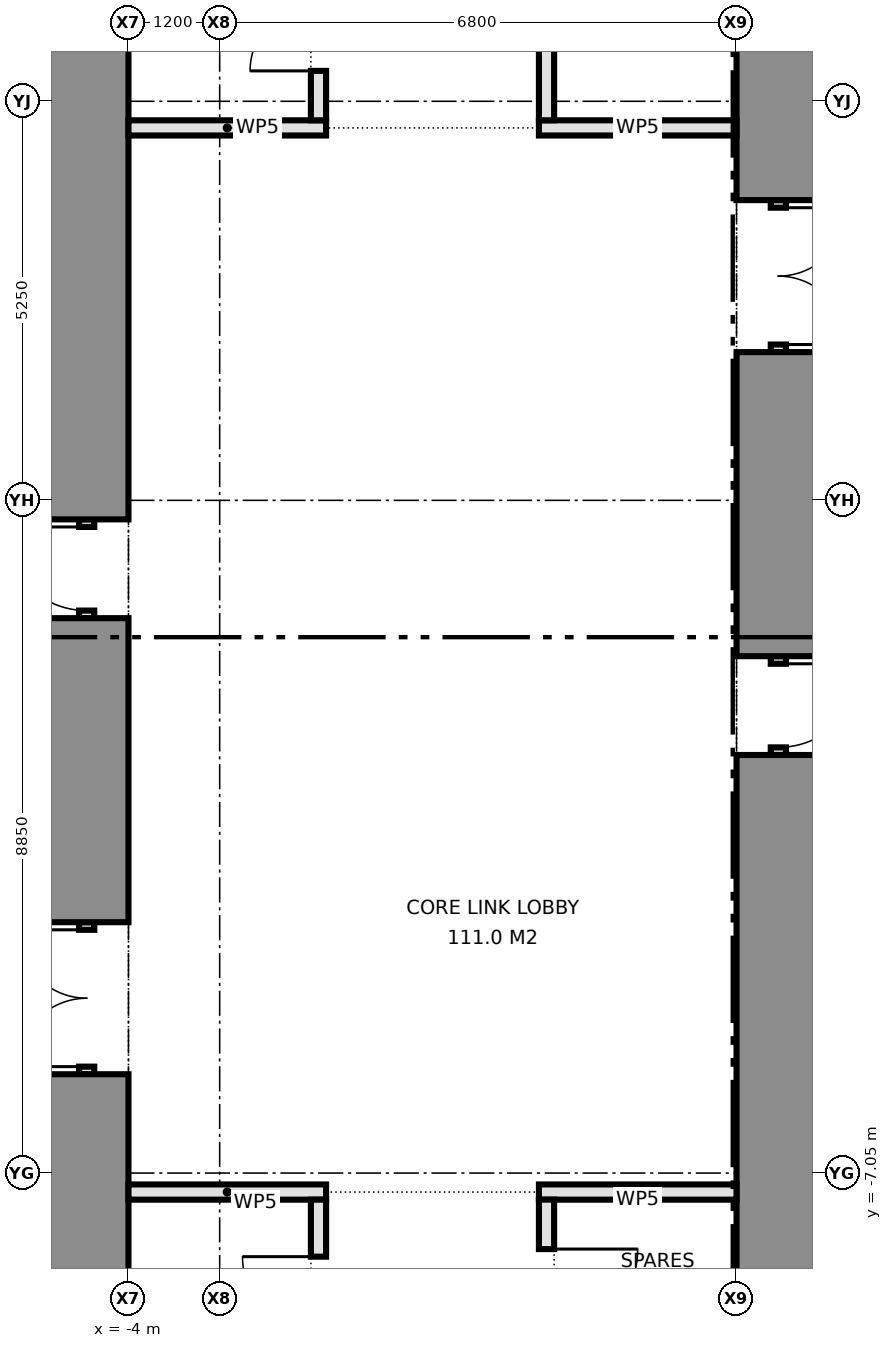
"""IFC4 building model, lengths in metres.
Left out: names, types, materials, properties, quantities, classifications, styles, units other than length and angle.
Written with IfcOpenShell. Run it as: python <this file> out.ifc"""

import sys

from ifc_helpers import new_model, si_unit, direction, frame, frame_2d, origin, place, context, subcontext, project, spatial, rectangle, extrude, element, fill, save


model = new_model("IFC4")
c1 = context("Model", 3, precision=1e-05, world=origin(), true_north=direction((0.0, 1.0)))
c2 = subcontext(c1, "Body", "Model", "MODEL_VIEW")
j1 = project(units=[si_unit("LENGTHUNIT", "METRE"), si_unit("PLANEANGLEUNIT", "RADIAN")], contexts=[c1])
p1 = place(None, origin())
s1 = spatial("IfcSite", under=j1, at=p1, CompositionType="ELEMENT")
p2 = place(p1, origin())
s2 = spatial("IfcBuilding", under=s1, at=p2, CompositionType="ELEMENT")
p3 = place(p2, frame((0.0, 0.0, 54.5)))
s3 = spatial("IfcBuildingStorey", under=s2, at=p3, CompositionType="ELEMENT", Elevation=54.5)
p4 = place(p3, frame((-4.55, -8.9, 0.0), z_axis=(0.0, 0.0, 1.0), x_axis=(0.0, 1.0, 0.0)))
e1 = element("IfcWall", 1, at=p4, inside=s3, PredefinedType="SHEAR", context=c2, shape_type="SweptSolid", body=[
    extrude(rectangle(XDim=3.15, YDim=1.1, at=frame_2d((1.575, 0.0))), origin(), (0.0, 0.0, 1.0), 4.575),
])
p5 = place(p3, frame((-4.55, -5.75, 0.0), z_axis=(0.0, 0.0, 1.0), x_axis=(0.0, 1.0, 0.0)))
e2 = element("IfcWall", 2, at=p5, inside=s3, PredefinedType="PARTITIONING", context=c2, shape_type="SweptSolid", body=[
    extrude(rectangle(XDim=2.0, YDim=0.2, at=frame_2d((1.0, 0.0))), origin(), (0.0, 0.0, 1.0), 2.4),
])
p6 = place(p5, frame((0.1, 0.0, 0.0)))
e3 = element("IfcOpeningElement", 3, at=p6, cuts=e2, PredefinedType="OPENING", context=c2, shape_type="SweptSolid", body=[
    extrude(rectangle(XDim=1.8, YDim=2.1, at=frame_2d((0.9, 1.05))), frame((0.0, 0.11, 0.0), z_axis=(0.0, -1.0, 0.0), x_axis=(1.0, 0.0, 0.0)), (0.0, 0.0, 1.0), 0.22),
])
p7 = place(p3, frame((-4.55, -3.75, 0.0), z_axis=(0.0, 0.0, 1.0), x_axis=(0.0, 1.0, 0.0)))
e4 = element("IfcWall", 4, at=p7, inside=s3, PredefinedType="SHEAR", context=c2, shape_type="SweptSolid", body=[
    extrude(rectangle(XDim=4.0, YDim=1.1, at=frame_2d((2.0, 0.0))), origin(), (0.0, 0.0, 1.0), 4.575),
])
p8 = place(p3, frame((-4.55, 0.25, 0.0), z_axis=(0.0, 0.0, 1.0), x_axis=(0.0, 1.0, 0.0)))
e5 = element("IfcWall", 5, at=p8, inside=s3, PredefinedType="PARTITIONING", context=c2, shape_type="SweptSolid", body=[
    extrude(rectangle(XDim=1.3, YDim=0.2, at=frame_2d((0.65, 0.0))), origin(), (0.0, 0.0, 1.0), 2.4),
])
p9 = place(p8, frame((0.1, 0.0, 0.0)))
e6 = element("IfcOpeningElement", 6, at=p9, cuts=e5, PredefinedType="OPENING", context=c2, shape_type="SweptSolid", body=[
    extrude(rectangle(XDim=1.1, YDim=2.1, at=frame_2d((0.55, 1.05))), frame((0.0, 0.11, 0.0), z_axis=(0.0, -1.0, 0.0), x_axis=(1.0, 0.0, 0.0)), (0.0, 0.0, 1.0), 0.22),
])
p10 = place(p3, frame((-4.55, 1.55, 0.0), z_axis=(0.0, 0.0, 1.0), x_axis=(0.0, 1.0, 0.0)))
e7 = element("IfcWall", 7, at=p10, inside=s3, PredefinedType="SHEAR", context=c2, shape_type="SweptSolid", body=[
    extrude(rectangle(XDim=7.35, YDim=1.1, at=frame_2d((3.675, 0.0))), origin(), (0.0, 0.0, 1.0), 4.575),
])
p11 = place(p3, frame((4.55, 8.9, 0.0), z_axis=(0.0, 0.0, 1.0), x_axis=(0.0, -1.0, 0.0)))
e8 = element("IfcWall", 8, at=p11, inside=s3, PredefinedType="SHEAR", context=c2, shape_type="SweptSolid", body=[
    extrude(rectangle(XDim=3.15, YDim=1.1, at=frame_2d((1.575, 0.0))), origin(), (0.0, 0.0, 1.0), 4.575),
])
p12 = place(p3, frame((4.55, 5.75, 0.0), z_axis=(0.0, 0.0, 1.0), x_axis=(0.0, -1.0, 0.0)))
e9 = element("IfcWall", 9, at=p12, inside=s3, PredefinedType="PARTITIONING", context=c2, shape_type="SweptSolid", body=[
    extrude(rectangle(XDim=2.0, YDim=0.2, at=frame_2d((1.0, 0.0))), origin(), (0.0, 0.0, 1.0), 2.4),
])
p13 = place(p12, frame((0.1, 0.0, 0.0)))
e10 = element("IfcOpeningElement", 10, at=p13, cuts=e9, PredefinedType="OPENING", context=c2, shape_type="SweptSolid", body=[
    extrude(rectangle(XDim=1.8, YDim=2.1, at=frame_2d((0.9, 1.05))), frame((0.0, 0.11, 0.0), z_axis=(0.0, -1.0, 0.0), x_axis=(1.0, 0.0, 0.0)), (0.0, 0.0, 1.0), 0.22),
])
p14 = place(p3, frame((4.55, 3.75, 0.0), z_axis=(0.0, 0.0, 1.0), x_axis=(0.0, -1.0, 0.0)))
e11 = element("IfcWall", 11, at=p14, inside=s3, PredefinedType="SHEAR", context=c2, shape_type="SweptSolid", body=[
    extrude(rectangle(XDim=4.0, YDim=1.1, at=frame_2d((2.0, 0.0))), origin(), (0.0, 0.0, 1.0), 4.575),
])
p15 = place(p3, frame((4.55, -0.25, 0.0), z_axis=(0.0, 0.0, 1.0), x_axis=(0.0, -1.0, 0.0)))
e12 = element("IfcWall", 12, at=p15, inside=s3, PredefinedType="PARTITIONING", context=c2, shape_type="SweptSolid", body=[
    extrude(rectangle(XDim=1.3, YDim=0.2, at=frame_2d((0.65, 0.0))), origin(), (0.0, 0.0, 1.0), 2.4),
])
p16 = place(p15, frame((0.1, 0.0, 0.0)))
e13 = element("IfcOpeningElement", 13, at=p16, cuts=e12, PredefinedType="OPENING", context=c2, shape_type="SweptSolid", body=[
    extrude(rectangle(XDim=1.1, YDim=2.1, at=frame_2d((0.55, 1.05))), frame((0.0, 0.11, 0.0), z_axis=(0.0, -1.0, 0.0), x_axis=(1.0, 0.0, 0.0)), (0.0, 0.0, 1.0), 0.22),
])
p17 = place(p3, frame((4.55, -1.55, 0.0), z_axis=(0.0, 0.0, 1.0), x_axis=(0.0, -1.0, 0.0)))
e14 = element("IfcWall", 14, at=p17, inside=s3, PredefinedType="SHEAR", context=c2, shape_type="SweptSolid", body=[
    extrude(rectangle(XDim=7.35, YDim=1.1, at=frame_2d((3.675, 0.0))), origin(), (0.0, 0.0, 1.0), 4.575),
])
for number, where, z_axis, x_axis in (
    (15, (-4.0, -7.3, 0.0), (0.0, 0.0, 1.0), (1.0, 0.0, 0.0)),
    (16, (1.4, -7.3, 0.0), (0.0, 0.0, 1.0), (1.0, 0.0, 0.0)),
    (17, (-4.0, 6.7, 0.0), (0.0, 0.0, 1.0), (1.0, 0.0, 0.0)),
    (18, (1.4, 6.7, 0.0), (0.0, 0.0, 1.0), (1.0, 0.0, 0.0)),
):
    element("IfcWall", number, at=place(p3, frame(where, z_axis=z_axis, x_axis=x_axis)), inside=s3, PredefinedType="PARTITIONING", context=c2, shape_type="SweptSolid", body=[
        extrude(rectangle(XDim=2.6, YDim=0.2, at=frame_2d((1.3, 0.0))), origin(), (0.0, 0.0, 1.0), 4.575),
    ])
p18 = place(p3, frame((1.5, -9.9, 0.0), z_axis=(0.0, 0.0, 1.0), x_axis=(0.0, 1.0, 0.0)))
e19 = element("IfcWall", 19, at=p18, inside=s3, PredefinedType="PARTITIONING", context=c2, shape_type="SweptSolid", body=[
    extrude(rectangle(XDim=2.5, YDim=0.2, at=frame_2d((1.25, 0.0))), origin(), (0.0, 0.0, 1.0), 4.575),
])
p19 = place(p18, frame((0.65, 0.0, 0.0)))
e20 = element("IfcOpeningElement", 20, at=p19, cuts=e19, PredefinedType="OPENING", context=c2, shape_type="SweptSolid", body=[
    extrude(rectangle(XDim=1.2, YDim=2.1, at=frame_2d((0.6, 1.05))), frame((0.0, 0.11, 0.0), z_axis=(0.0, -1.0, 0.0), x_axis=(1.0, 0.0, 0.0)), (0.0, 0.0, 1.0), 0.22),
])
p20 = place(p3, frame((1.5, 6.8, 0.0), z_axis=(0.0, 0.0, 1.0), x_axis=(0.0, 1.0, 0.0)))
e21 = element("IfcWall", 21, at=p20, inside=s3, PredefinedType="PARTITIONING", context=c2, shape_type="SweptSolid", body=[
    extrude(rectangle(XDim=3.1, YDim=0.2, at=frame_2d((1.55, 0.0))), origin(), (0.0, 0.0, 1.0), 4.575),
])
p21 = place(p20, frame((1.05, 0.0, 0.0)))
e22 = element("IfcOpeningElement", 22, at=p21, cuts=e21, PredefinedType="OPENING", context=c2, shape_type="SweptSolid", body=[
    extrude(rectangle(XDim=1.0, YDim=2.1, at=frame_2d((0.5, 1.05))), frame((0.0, 0.11, 0.0), z_axis=(0.0, -1.0, 0.0), x_axis=(1.0, 0.0, 0.0)), (0.0, 0.0, 1.0), 0.22),
])
p22 = place(p3, frame((-1.5, -9.9, 0.0), z_axis=(0.0, 0.0, 1.0), x_axis=(0.0, 1.0, 0.0)))
e23 = element("IfcWall", 23, at=p22, inside=s3, PredefinedType="PARTITIONING", context=c2, shape_type="SweptSolid", body=[
    extrude(rectangle(XDim=2.5, YDim=0.2, at=frame_2d((1.25, 0.0))), origin(), (0.0, 0.0, 1.0), 4.575),
])
p23 = place(p22, frame((0.75, 0.0, 0.0)))
e24 = element("IfcOpeningElement", 24, at=p23, cuts=e23, PredefinedType="OPENING", context=c2, shape_type="SweptSolid", body=[
    extrude(rectangle(XDim=1.0, YDim=2.1, at=frame_2d((0.5, 1.05))), frame((0.0, 0.11, 0.0), z_axis=(0.0, -1.0, 0.0), x_axis=(1.0, 0.0, 0.0)), (0.0, 0.0, 1.0), 0.22),
])
p24 = place(p3, frame((-1.5, 6.8, 0.0), z_axis=(0.0, 0.0, 1.0), x_axis=(0.0, 1.0, 0.0)))
e25 = element("IfcWall", 25, at=p24, inside=s3, PredefinedType="PARTITIONING", context=c2, shape_type="SweptSolid", body=[
    extrude(rectangle(XDim=3.1, YDim=0.2, at=frame_2d((1.55, 0.0))), origin(), (0.0, 0.0, 1.0), 4.575),
])
p25 = place(p24, frame((0.65, 0.0, 0.0)))
e26 = element("IfcOpeningElement", 26, at=p25, cuts=e25, PredefinedType="OPENING", context=c2, shape_type="SweptSolid", body=[
    extrude(rectangle(XDim=1.8, YDim=2.1, at=frame_2d((0.9, 1.05))), frame((0.0, 0.11, 0.0), z_axis=(0.0, -1.0, 0.0), x_axis=(1.0, 0.0, 0.0)), (0.0, 0.0, 1.0), 0.22),
])
p26 = place(p6, origin())
e27 = element("IfcDoor", 27, at=p26, inside=s3, OperationType="DOUBLE_DOOR_SINGLE_SWING", PredefinedType="DOOR", context=c2, shape_type="SweptSolid", body=[
    extrude(rectangle(XDim=1.8, YDim=2.1, at=frame_2d((0.9, 1.05))), frame((0.0, 0.025, 0.0), z_axis=(0.0, -1.0, 0.0), x_axis=(1.0, 0.0, 0.0)), (0.0, 0.0, 1.0), 0.05),
])
fill(e3, e27)
p27 = place(p9, origin())
e28 = element("IfcDoor", 28, at=p27, inside=s3, OperationType="SINGLE_SWING_RIGHT", PredefinedType="DOOR", context=c2, shape_type="SweptSolid", body=[
    extrude(rectangle(XDim=1.1, YDim=2.1, at=frame_2d((0.55, 1.05))), frame((0.0, 0.025, 0.0), z_axis=(0.0, -1.0, 0.0), x_axis=(1.0, 0.0, 0.0)), (0.0, 0.0, 1.0), 0.05),
])
fill(e6, e28)
p28 = place(p13, origin())
e29 = element("IfcDoor", 29, at=p28, inside=s3, OperationType="DOUBLE_DOOR_SINGLE_SWING", PredefinedType="DOOR", context=c2, shape_type="SweptSolid", body=[
    extrude(rectangle(XDim=1.8, YDim=2.1, at=frame_2d((0.9, 1.05))), frame((0.0, 0.025, 0.0), z_axis=(0.0, -1.0, 0.0), x_axis=(1.0, 0.0, 0.0)), (0.0, 0.0, 1.0), 0.05),
])
fill(e10, e29)
p29 = place(p16, origin())
e30 = element("IfcDoor", 30, at=p29, inside=s3, OperationType="SINGLE_SWING_LEFT", PredefinedType="DOOR", context=c2, shape_type="SweptSolid", body=[
    extrude(rectangle(XDim=1.1, YDim=2.1, at=frame_2d((0.55, 1.05))), frame((0.0, 0.025, 0.0), z_axis=(0.0, -1.0, 0.0), x_axis=(1.0, 0.0, 0.0)), (0.0, 0.0, 1.0), 0.05),
])
fill(e13, e30)
p30 = place(p25, origin())
e31 = element("IfcDoor", 31, at=p30, inside=s3, OperationType="DOUBLE_DOOR_SINGLE_SWING", PredefinedType="DOOR", context=c2, shape_type="SweptSolid", body=[
    extrude(rectangle(XDim=1.8, YDim=2.1, at=frame_2d((0.9, 1.05))), frame((0.0, 0.025, 0.0), z_axis=(0.0, -1.0, 0.0), x_axis=(1.0, 0.0, 0.0)), (0.0, 0.0, 1.0), 0.05),
])
fill(e26, e31)
p31 = place(p23, origin())
e32 = element("IfcDoor", 32, at=p31, inside=s3, OperationType="SINGLE_SWING_RIGHT", PredefinedType="DOOR", context=c2, shape_type="SweptSolid", body=[
    extrude(rectangle(XDim=1.0, YDim=2.1, at=frame_2d((0.5, 1.05))), frame((0.0, 0.025, 0.0), z_axis=(0.0, -1.0, 0.0), x_axis=(1.0, 0.0, 0.0)), (0.0, 0.0, 1.0), 0.05),
])
fill(e24, e32)
p32 = place(p19, frame((1.2, 0.0, 0.0), z_axis=(0.0, 0.0, 1.0), x_axis=(-1.0, 0.0, 0.0)))
e33 = element("IfcDoor", 33, at=p32, inside=s3, OperationType="SINGLE_SWING_LEFT", PredefinedType="DOOR", context=c2, shape_type="SweptSolid", body=[
    extrude(rectangle(XDim=1.2, YDim=2.1, at=frame_2d((0.6, 1.05))), frame((0.0, 0.025, 0.0), z_axis=(0.0, -1.0, 0.0), x_axis=(1.0, 0.0, 0.0)), (0.0, 0.0, 1.0), 0.05),
])
fill(e20, e33)
save(model, sys.argv[1])
